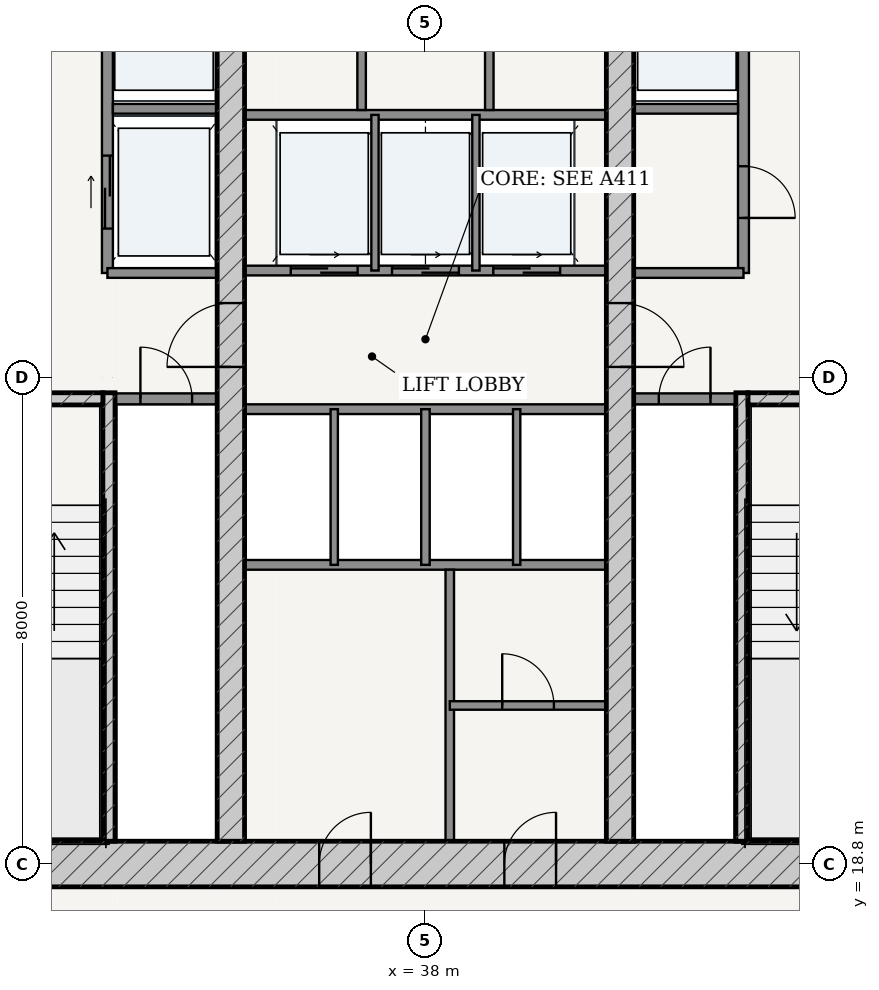
"""IFC4 building model, lengths in metres.
Left out: names, types, materials, properties, quantities, classifications, styles, units other than length and angle.
Written with IfcOpenShell. Run it as: python <this file> out.ifc"""

import sys

from ifc_helpers import new_model, si_unit, direction, frame, frame_2d, origin, place, context, subcontext, project, spatial, rectangle, extrude, source, transform, mapped, element, fill, save


model = new_model("IFC4")
c1 = context("Model", 3, precision=1e-05, world=origin(), true_north=direction((-0.2419218956, 0.970295726276)))
c2 = subcontext(c1, "Body", "Model", "MODEL_VIEW")
j1 = project(units=[si_unit("LENGTHUNIT", "METRE"), si_unit("PLANEANGLEUNIT", "RADIAN")], contexts=[c1])
p1 = place(None, origin())
s1 = spatial("IfcSite", under=j1, at=p1, CompositionType="ELEMENT")
p2 = place(p1, origin())
s2 = spatial("IfcBuilding", under=s1, at=p2, CompositionType="ELEMENT")
p3 = place(p2, frame((0.0, 0.0, 45.6)))
s3 = spatial("IfcBuildingStorey", under=s2, at=p3, CompositionType="ELEMENT", Elevation=45.6)
p4 = place(p3, frame((28.625, 18.8, 0.0), z_axis=(0.0, 0.0, 1.0), x_axis=(1.0, 0.0, 0.0)))
e1 = element("IfcWall", 1, at=p4, inside=s3, PredefinedType="SHEAR", context=c2, shape_type="SweptSolid", body=[
    extrude(rectangle(XDim=18.75, YDim=0.75, at=frame_2d((9.375, 0.0))), origin(), (0.0, 0.0, 1.0), 3.32),
])
p5 = place(p4, frame((7.627, 0.0, 0.0)))
e2 = element("IfcOpeningElement", 2, at=p5, cuts=e1, PredefinedType="OPENING", context=c2, shape_type="SweptSolid", body=[
    extrude(rectangle(XDim=0.85, YDim=2.1, at=frame_2d((0.425, 1.05))), frame((0.0, 0.385, 0.0), z_axis=(0.0, -1.0, 0.0), x_axis=(1.0, 0.0, 0.0)), (0.0, 0.0, 1.0), 0.77),
])
p6 = place(p4, frame((10.673, 0.0, 0.0)))
e3 = element("IfcOpeningElement", 3, at=p6, cuts=e1, PredefinedType="OPENING", context=c2, shape_type="SweptSolid", body=[
    extrude(rectangle(XDim=0.85, YDim=2.1, at=frame_2d((0.425, 1.05))), frame((0.0, 0.385, 0.0), z_axis=(0.0, -1.0, 0.0), x_axis=(1.0, 0.0, 0.0)), (0.0, 0.0, 1.0), 0.77),
])
p7 = place(p3, frame((32.795, 19.175, 0.0), z_axis=(0.0, 0.0, 1.0), x_axis=(0.0, 1.0, 0.0)))
e4 = element("IfcWall", 4, at=p7, inside=s3, PredefinedType="SOLIDWALL", context=c2, shape_type="SweptSolid", body=[
    extrude(rectangle(XDim=7.375, YDim=0.2, at=frame_2d((3.688, 0.0))), origin(), (0.0, 0.0, 1.0), 3.32),
])
p8 = place(p3, frame((29.375, 26.45, 0.0), z_axis=(0.0, 0.0, 1.0), x_axis=(1.0, 0.0, 0.0)))
e5 = element("IfcWall", 5, at=p8, inside=s3, PredefinedType="SOLIDWALL", context=c2, shape_type="SweptSolid", body=[
    extrude(rectangle(XDim=3.32, YDim=0.2, at=frame_2d((1.66, 0.0))), origin(), (0.0, 0.0, 1.0), 3.32),
])
p9 = place(p8, frame((1.185, 0.0, 0.0)))
e6 = element("IfcOpeningElement", 6, at=p9, cuts=e5, PredefinedType="OPENING", context=c2, shape_type="SweptSolid", body=[
    extrude(rectangle(XDim=0.95, YDim=2.15, at=frame_2d((0.475, 1.075))), frame((0.0, 0.11, 0.0), z_axis=(0.0, -1.0, 0.0), x_axis=(1.0, 0.0, 0.0)), (0.0, 0.0, 1.0), 0.22),
])
p10 = place(p3, frame((43.205, 19.175, 0.0), z_axis=(0.0, 0.0, 1.0), x_axis=(0.0, 1.0, 0.0)))
e7 = element("IfcWall", 7, at=p10, inside=s3, PredefinedType="SOLIDWALL", context=c2, shape_type="SweptSolid", body=[
    extrude(rectangle(XDim=7.375, YDim=0.2, at=frame_2d((3.688, 0.0))), origin(), (0.0, 0.0, 1.0), 3.32),
])
p11 = place(p3, frame((43.305, 26.45, 0.0), z_axis=(0.0, 0.0, 1.0), x_axis=(1.0, 0.0, 0.0)))
e8 = element("IfcWall", 8, at=p11, inside=s3, PredefinedType="SOLIDWALL", context=c2, shape_type="SweptSolid", body=[
    extrude(rectangle(XDim=3.32, YDim=0.2, at=frame_2d((1.66, 0.0))), origin(), (0.0, 0.0, 1.0), 3.32),
])
p12 = place(p11, frame((1.185, 0.0, 0.0)))
e9 = element("IfcOpeningElement", 9, at=p12, cuts=e8, PredefinedType="OPENING", context=c2, shape_type="SweptSolid", body=[
    extrude(rectangle(XDim=0.95, YDim=2.15, at=frame_2d((0.475, 1.075))), frame((0.0, 0.11, 0.0), z_axis=(0.0, -1.0, 0.0), x_axis=(1.0, 0.0, 0.0)), (0.0, 0.0, 1.0), 0.22),
])
p13 = place(p3, frame((34.8, 19.175, 0.0), z_axis=(0.0, 0.0, 1.0), x_axis=(0.0, 1.0, 0.0)))
e10 = element("IfcWall", 10, at=p13, inside=s3, PredefinedType="SHEAR", context=c2, shape_type="SweptSolid", body=[
    extrude(rectangle(XDim=15.25, YDim=0.45, at=frame_2d((7.625, 0.0))), origin(), (0.0, 0.0, 1.0), 3.32),
])
p14 = place(p13, frame((7.8, 0.0, 0.0)))
e11 = element("IfcOpeningElement", 11, at=p14, cuts=e10, PredefinedType="OPENING", context=c2, shape_type="SweptSolid", body=[
    extrude(rectangle(XDim=1.05, YDim=2.15, at=frame_2d((0.525, 1.075))), frame((0.0, 0.235, 0.0), z_axis=(0.0, -1.0, 0.0), x_axis=(1.0, 0.0, 0.0)), (0.0, 0.0, 1.0), 0.47),
])
p15 = place(p3, frame((41.2, 19.175, 0.0), z_axis=(0.0, 0.0, 1.0), x_axis=(0.0, 1.0, 0.0)))
e12 = element("IfcWall", 12, at=p15, inside=s3, PredefinedType="SHEAR", context=c2, shape_type="SweptSolid", body=[
    extrude(rectangle(XDim=15.25, YDim=0.45, at=frame_2d((7.625, 0.0))), origin(), (0.0, 0.0, 1.0), 3.32),
])
p16 = place(p15, frame((7.8, 0.0, 0.0)))
e13 = element("IfcOpeningElement", 13, at=p16, cuts=e12, PredefinedType="OPENING", context=c2, shape_type="SweptSolid", body=[
    extrude(rectangle(XDim=1.05, YDim=2.15, at=frame_2d((0.525, 1.075))), frame((0.0, 0.235, 0.0), z_axis=(0.0, -1.0, 0.0), x_axis=(1.0, 0.0, 0.0)), (0.0, 0.0, 1.0), 0.47),
])
p17 = place(p3, frame((32.9, 26.45, 0.0), z_axis=(0.0, 0.0, 1.0), x_axis=(1.0, 0.0, 0.0)))
e14 = element("IfcWall", 14, at=p17, inside=s3, PredefinedType="PARTITIONING", context=c2, shape_type="SweptSolid", body=[
    extrude(rectangle(XDim=1.675, YDim=0.18, at=frame_2d((0.837, 0.0))), origin(), (0.0, 0.0, 1.0), 3.32),
])
p18 = place(p17, frame((0.413, 0.0, 0.0)))
e15 = element("IfcOpeningElement", 15, at=p18, cuts=e14, PredefinedType="OPENING", context=c2, shape_type="SweptSolid", body=[
    extrude(rectangle(XDim=0.85, YDim=2.1, at=frame_2d((0.425, 1.05))), frame((0.0, 0.1, 0.0), z_axis=(0.0, -1.0, 0.0), x_axis=(1.0, 0.0, 0.0)), (0.0, 0.0, 1.0), 0.2),
])
p19 = place(p3, frame((41.425, 26.45, 0.0), z_axis=(0.0, 0.0, 1.0), x_axis=(1.0, 0.0, 0.0)))
e16 = element("IfcWall", 16, at=p19, inside=s3, PredefinedType="PARTITIONING", context=c2, shape_type="SweptSolid", body=[
    extrude(rectangle(XDim=1.675, YDim=0.18, at=frame_2d((0.837, 0.0))), origin(), (0.0, 0.0, 1.0), 3.32),
])
p20 = place(p19, frame((0.413, 0.0, 0.0)))
e17 = element("IfcOpeningElement", 17, at=p20, cuts=e16, PredefinedType="OPENING", context=c2, shape_type="SweptSolid", body=[
    extrude(rectangle(XDim=0.85, YDim=2.1, at=frame_2d((0.425, 1.05))), frame((0.0, 0.1, 0.0), z_axis=(0.0, -1.0, 0.0), x_axis=(1.0, 0.0, 0.0)), (0.0, 0.0, 1.0), 0.2),
])
p21 = place(p3, frame((32.77, 28.52, 0.0), z_axis=(0.0, 0.0, 1.0), x_axis=(0.0, 1.0, 0.0)))
e18 = element("IfcWall", 18, at=p21, inside=s3, PredefinedType="PARTITIONING", context=c2, shape_type="SweptSolid", body=[
    extrude(rectangle(XDim=5.905, YDim=0.18, at=frame_2d((2.953, 0.0))), origin(), (0.0, 0.0, 1.0), 3.32),
])
p22 = place(p21, frame((3.655, 0.0, 0.0)))
e19 = element("IfcOpeningElement", 19, at=p22, cuts=e18, PredefinedType="OPENING", context=c2, shape_type="SweptSolid", body=[
    extrude(rectangle(XDim=1.15, YDim=2.2, at=frame_2d((0.575, 1.1))), frame((0.0, 0.1, 0.0), z_axis=(0.0, -1.0, 0.0), x_axis=(1.0, 0.0, 0.0)), (0.0, 0.0, 1.0), 0.2),
])
p23 = place(p21, frame((0.73, 0.0, 0.0)))
e20 = element("IfcOpeningElement", 20, at=p23, cuts=e18, PredefinedType="OPENING", context=c2, shape_type="SweptSolid", body=[
    extrude(rectangle(XDim=1.2, YDim=2.25, at=frame_2d((0.6, 1.125))), frame((0.0, 0.1, 0.0), z_axis=(0.0, -1.0, 0.0), x_axis=(1.0, 0.0, 0.0)), (0.0, 0.0, 1.0), 0.2),
])
p24 = place(p3, frame((32.86, 31.22, 0.0), z_axis=(0.0, 0.0, 1.0), x_axis=(1.0, 0.0, 0.0)))
e21 = element("IfcWall", 21, at=p24, inside=s3, PredefinedType="PARTITIONING", context=c2, shape_type="SweptSolid", body=[
    extrude(rectangle(XDim=1.715, YDim=0.16, at=frame_2d((0.857, 0.0))), origin(), (0.0, 0.0, 1.0), 3.32),
])
p25 = place(p3, frame((32.77, 28.52, 0.0), z_axis=(0.0, 0.0, 1.0), x_axis=(1.0, 0.0, 0.0)))
e22 = element("IfcWall", 22, at=p25, inside=s3, PredefinedType="PARTITIONING", context=c2, shape_type="SweptSolid", body=[
    extrude(rectangle(XDim=1.805, YDim=0.16, at=frame_2d((0.902, 0.0))), origin(), (0.0, 0.0, 1.0), 3.32),
])
p26 = place(p3, frame((43.23, 28.52, 0.0), z_axis=(0.0, 0.0, 1.0), x_axis=(0.0, 1.0, 0.0)))
e23 = element("IfcWall", 23, at=p26, inside=s3, PredefinedType="PARTITIONING", context=c2, shape_type="SweptSolid", body=[
    extrude(rectangle(XDim=5.905, YDim=0.18, at=frame_2d((2.953, 0.0))), origin(), (0.0, 0.0, 1.0), 3.32),
])
p27 = place(p26, frame((0.905, 0.0, 0.0)))
e24 = element("IfcOpeningElement", 24, at=p27, cuts=e23, PredefinedType="OPENING", context=c2, shape_type="SweptSolid", body=[
    extrude(rectangle(XDim=0.85, YDim=2.1, at=frame_2d((0.425, 1.05))), frame((0.0, 0.1, 0.0), z_axis=(0.0, -1.0, 0.0), x_axis=(1.0, 0.0, 0.0)), (0.0, 0.0, 1.0), 0.2),
])
p28 = place(p26, frame((3.655, 0.0, 0.0)))
e25 = element("IfcOpeningElement", 25, at=p28, cuts=e23, PredefinedType="OPENING", context=c2, shape_type="SweptSolid", body=[
    extrude(rectangle(XDim=1.15, YDim=2.2, at=frame_2d((0.575, 1.1))), frame((0.0, 0.1, 0.0), z_axis=(0.0, -1.0, 0.0), x_axis=(1.0, 0.0, 0.0)), (0.0, 0.0, 1.0), 0.2),
])
p29 = place(p3, frame((41.425, 31.22, 0.0), z_axis=(0.0, 0.0, 1.0), x_axis=(1.0, 0.0, 0.0)))
e26 = element("IfcWall", 26, at=p29, inside=s3, PredefinedType="PARTITIONING", context=c2, shape_type="SweptSolid", body=[
    extrude(rectangle(XDim=1.715, YDim=0.16, at=frame_2d((0.857, 0.0))), origin(), (0.0, 0.0, 1.0), 3.32),
])
p30 = place(p3, frame((41.425, 28.52, 0.0), z_axis=(0.0, 0.0, 1.0), x_axis=(1.0, 0.0, 0.0)))
e27 = element("IfcWall", 27, at=p30, inside=s3, PredefinedType="PARTITIONING", context=c2, shape_type="SweptSolid", body=[
    extrude(rectangle(XDim=1.805, YDim=0.16, at=frame_2d((0.902, 0.0))), origin(), (0.0, 0.0, 1.0), 3.32),
])
p31 = place(p3, frame((35.025, 28.56, 0.0), z_axis=(0.0, 0.0, 1.0), x_axis=(1.0, 0.0, 0.0)))
e28 = element("IfcWall", 28, at=p31, inside=s3, PredefinedType="PARTITIONING", context=c2, shape_type="SweptSolid", body=[
    extrude(rectangle(XDim=5.95, YDim=0.16, at=frame_2d((2.975, 0.0))), origin(), (0.0, 0.0, 1.0), 3.32),
])
p32 = place(p31, frame((0.76, 0.0, 0.0)))
e29 = element("IfcOpeningElement", 29, at=p32, cuts=e28, PredefinedType="OPENING", context=c2, shape_type="SweptSolid", body=[
    extrude(rectangle(XDim=1.1, YDim=2.2, at=frame_2d((0.55, 1.1))), frame((0.0, 0.09, 0.0), z_axis=(0.0, -1.0, 0.0), x_axis=(1.0, 0.0, 0.0)), (0.0, 0.0, 1.0), 0.18),
])
p33 = place(p31, frame((2.425, 0.0, 0.0)))
e30 = element("IfcOpeningElement", 30, at=p33, cuts=e28, PredefinedType="OPENING", context=c2, shape_type="SweptSolid", body=[
    extrude(rectangle(XDim=1.1, YDim=2.2, at=frame_2d((0.55, 1.1))), frame((0.0, 0.09, 0.0), z_axis=(0.0, -1.0, 0.0), x_axis=(1.0, 0.0, 0.0)), (0.0, 0.0, 1.0), 0.18),
])
p34 = place(p31, frame((4.09, 0.0, 0.0)))
e31 = element("IfcOpeningElement", 31, at=p34, cuts=e28, PredefinedType="OPENING", context=c2, shape_type="SweptSolid", body=[
    extrude(rectangle(XDim=1.1, YDim=2.2, at=frame_2d((0.55, 1.1))), frame((0.0, 0.09, 0.0), z_axis=(0.0, -1.0, 0.0), x_axis=(1.0, 0.0, 0.0)), (0.0, 0.0, 1.0), 0.18),
])
p35 = place(p3, frame((35.025, 31.12, 0.0), z_axis=(0.0, 0.0, 1.0), x_axis=(1.0, 0.0, 0.0)))
e32 = element("IfcWall", 32, at=p35, inside=s3, PredefinedType="PARTITIONING", context=c2, shape_type="SweptSolid", body=[
    extrude(rectangle(XDim=5.95, YDim=0.16, at=frame_2d((2.975, 0.0))), origin(), (0.0, 0.0, 1.0), 3.32),
])
for number, where, z_axis, x_axis in (
    (33, (37.17, 28.56, 0.0), (0.0, 0.0, 1.0), (0.0, 1.0, 0.0)),
    (34, (38.83, 28.56, 0.0), (0.0, 0.0, 1.0), (0.0, 1.0, 0.0)),
):
    element("IfcWall", number, at=place(p3, frame(where, z_axis=z_axis, x_axis=x_axis)), inside=s3, PredefinedType="PARTITIONING", context=c2, shape_type="SweptSolid", body=[
        extrude(rectangle(XDim=2.56, YDim=0.12, at=frame_2d((1.28, 0.0))), origin(), (0.0, 0.0, 1.0), 3.32),
    ])
for number, where, z_axis, x_axis in (
    (35, (36.95, 31.2, 0.0), (0.0, 0.0, 1.0), (0.0, 1.0, 0.0)),
    (36, (39.05, 31.2, 0.0), (0.0, 0.0, 1.0), (0.0, 1.0, 0.0)),
):
    element("IfcWall", number, at=place(p3, frame(where, z_axis=z_axis, x_axis=x_axis)), inside=s3, PredefinedType="PARTITIONING", context=c2, shape_type="SweptSolid", body=[
        extrude(rectangle(XDim=3.225, YDim=0.14, at=frame_2d((1.613, 0.0))), origin(), (0.0, 0.0, 1.0), 3.32),
    ])
for number, where, z_axis, x_axis in (
    (37, (35.025, 26.28, 0.0), (0.0, 0.0, 1.0), (1.0, 0.0, 0.0)),
    (38, (35.025, 23.72, 0.0), (0.0, 0.0, 1.0), (1.0, 0.0, 0.0)),
):
    element("IfcWall", number, at=place(p3, frame(where, z_axis=z_axis, x_axis=x_axis)), inside=s3, PredefinedType="PARTITIONING", context=c2, shape_type="SweptSolid", body=[
        extrude(rectangle(XDim=5.95, YDim=0.16, at=frame_2d((2.975, 0.0))), origin(), (0.0, 0.0, 1.0), 3.32),
    ])
p36 = place(p3, frame((36.5, 23.72, 0.0), z_axis=(0.0, 0.0, 1.0), x_axis=(0.0, 1.0, 0.0)))
e39 = element("IfcWall", 39, at=p36, inside=s3, PredefinedType="PARTITIONING", context=c2, shape_type="SweptSolid", body=[
    extrude(rectangle(XDim=2.56, YDim=0.12, at=frame_2d((1.28, 0.0))), origin(), (0.0, 0.0, 1.0), 3.32),
])
p37 = place(p3, frame((38.0, 23.72, 0.0), z_axis=(0.0, 0.0, 1.0), x_axis=(0.0, 1.0, 0.0)))
e40 = element("IfcWall", 40, at=p37, inside=s3, PredefinedType="PARTITIONING", context=c2, shape_type="SweptSolid", body=[
    extrude(rectangle(XDim=2.56, YDim=0.14, at=frame_2d((1.28, 0.0))), origin(), (0.0, 0.0, 1.0), 3.32),
])
p38 = place(p3, frame((39.5, 23.72, 0.0), z_axis=(0.0, 0.0, 1.0), x_axis=(0.0, 1.0, 0.0)))
e41 = element("IfcWall", 41, at=p38, inside=s3, PredefinedType="PARTITIONING", context=c2, shape_type="SweptSolid", body=[
    extrude(rectangle(XDim=2.56, YDim=0.12, at=frame_2d((1.28, 0.0))), origin(), (0.0, 0.0, 1.0), 3.32),
])
p39 = place(p3, frame((38.4, 19.175, 0.0), z_axis=(0.0, 0.0, 1.0), x_axis=(0.0, 1.0, 0.0)))
e42 = element("IfcWall", 42, at=p39, inside=s3, PredefinedType="PARTITIONING", context=c2, shape_type="SweptSolid", body=[
    extrude(rectangle(XDim=4.465, YDim=0.14, at=frame_2d((2.232, 0.0))), origin(), (0.0, 0.0, 1.0), 3.32),
])
p40 = place(p3, frame((38.4, 21.407, 0.0), z_axis=(0.0, 0.0, 1.0), x_axis=(1.0, 0.0, 0.0)))
e43 = element("IfcWall", 43, at=p40, inside=s3, PredefinedType="PARTITIONING", context=c2, shape_type="SweptSolid", body=[
    extrude(rectangle(XDim=2.575, YDim=0.14, at=frame_2d((1.288, 0.0))), origin(), (0.0, 0.0, 1.0), 3.32),
])
p41 = place(p40, frame((0.863, 0.0, 0.0)))
e44 = element("IfcOpeningElement", 44, at=p41, cuts=e43, PredefinedType="OPENING", context=c2, shape_type="SweptSolid", body=[
    extrude(rectangle(XDim=0.85, YDim=2.1, at=frame_2d((0.425, 1.05))), frame((0.0, 0.08, 0.0), z_axis=(0.0, -1.0, 0.0), x_axis=(1.0, 0.0, 0.0)), (0.0, 0.0, 1.0), 0.16),
])
m1 = source(origin(), c2, "Body", "SweptSolid", [
    extrude(rectangle(XDim=1.05, YDim=2.15, at=frame_2d((0.525, 1.075))), frame((0.0, 0.025, 0.0), z_axis=(0.0, -1.0, 0.0), x_axis=(1.0, 0.0, 0.0)), (0.0, 0.0, 1.0), 0.05),
])
p42 = place(p14, origin())
e45 = element("IfcDoor", 45, at=p42, inside=s3, OperationType="SINGLE_SWING_LEFT", PredefinedType="DOOR", context=c2, shape_type="MappedRepresentation", body=[
    mapped(m1, transform((0.0, 0.0, 0.0), scale=1.0)),
])
fill(e11, e45)
p43 = place(p16, frame((1.05, 0.0, 0.0), z_axis=(0.0, 0.0, 1.0), x_axis=(-1.0, 0.0, 0.0)))
e46 = element("IfcDoor", 46, at=p43, inside=s3, OperationType="SINGLE_SWING_RIGHT", PredefinedType="DOOR", context=c2, shape_type="MappedRepresentation", body=[
    mapped(m1, transform((0.0, 0.0, 0.0), scale=1.0)),
])
fill(e13, e46)
m2 = source(origin(), c2, "Body", "SweptSolid", [
    extrude(rectangle(XDim=0.85, YDim=2.1, at=frame_2d((0.425, 1.05))), frame((0.0, 0.025, 0.0), z_axis=(0.0, -1.0, 0.0), x_axis=(1.0, 0.0, 0.0)), (0.0, 0.0, 1.0), 0.05),
])
p44 = place(p18, origin())
e47 = element("IfcDoor", 47, at=p44, inside=s3, OperationType="SINGLE_SWING_LEFT", PredefinedType="DOOR", context=c2, shape_type="MappedRepresentation", body=[
    mapped(m2, transform((0.0, 0.0, 0.0), scale=1.0)),
])
fill(e15, e47)
p45 = place(p20, origin())
e48 = element("IfcDoor", 48, at=p45, inside=s3, OperationType="SINGLE_SWING_RIGHT", PredefinedType="DOOR", context=c2, shape_type="MappedRepresentation", body=[
    mapped(m2, transform((0.0, 0.0, 0.0), scale=1.0)),
])
fill(e17, e48)
p46 = place(p27, frame((0.85, 0.0, 0.0), z_axis=(0.0, 0.0, 1.0), x_axis=(-1.0, 0.0, 0.0)))
e49 = element("IfcDoor", 49, at=p46, inside=s3, OperationType="SINGLE_SWING_RIGHT", PredefinedType="DOOR", context=c2, shape_type="MappedRepresentation", body=[
    mapped(m2, transform((0.0, 0.0, 0.0), scale=1.0)),
])
fill(e24, e49)
p47 = place(p5, origin())
e50 = element("IfcDoor", 50, at=p47, inside=s3, OperationType="SINGLE_SWING_RIGHT", PredefinedType="DOOR", context=c2, shape_type="MappedRepresentation", body=[
    mapped(m2, transform((0.0, 0.0, 0.0), scale=1.0)),
])
fill(e2, e50)
p48 = place(p6, origin())
e51 = element("IfcDoor", 51, at=p48, inside=s3, OperationType="SINGLE_SWING_RIGHT", PredefinedType="DOOR", context=c2, shape_type="MappedRepresentation", body=[
    mapped(m2, transform((0.0, 0.0, 0.0), scale=1.0)),
])
fill(e3, e51)
p49 = place(p41, origin())
e52 = element("IfcDoor", 52, at=p49, inside=s3, OperationType="SINGLE_SWING_LEFT", PredefinedType="DOOR", context=c2, shape_type="MappedRepresentation", body=[
    mapped(m2, transform((0.0, 0.0, 0.0), scale=1.0)),
])
fill(e44, e52)
m3 = source(origin(), c2, "Body", "SweptSolid", [
    extrude(rectangle(XDim=1.2, YDim=2.25, at=frame_2d((0.6, 1.125))), frame((0.0, 0.025, 0.0), z_axis=(0.0, -1.0, 0.0), x_axis=(1.0, 0.0, 0.0)), (0.0, 0.0, 1.0), 0.05),
])
p50 = place(p23, origin())
e53 = element("IfcDoor", 53, at=p50, inside=s3, OperationType="DOUBLE_DOOR_SLIDING", PredefinedType="DOOR", context=c2, shape_type="MappedRepresentation", body=[
    mapped(m3, transform((0.0, 0.0, 0.0), scale=1.0)),
])
fill(e20, e53)
m4 = source(origin(), c2, "Body", "SweptSolid", [
    extrude(rectangle(XDim=1.1, YDim=2.2, at=frame_2d((0.55, 1.1))), frame((0.0, 0.025, 0.0), z_axis=(0.0, -1.0, 0.0), x_axis=(1.0, 0.0, 0.0)), (0.0, 0.0, 1.0), 0.05),
])
p51 = place(p32, origin())
e54 = element("IfcDoor", 54, at=p51, inside=s3, OperationType="DOUBLE_DOOR_SLIDING", PredefinedType="DOOR", context=c2, shape_type="MappedRepresentation", body=[
    mapped(m4, transform((0.0, 0.0, 0.0), scale=1.0)),
])
fill(e29, e54)
p52 = place(p33, origin())
e55 = element("IfcDoor", 55, at=p52, inside=s3, OperationType="DOUBLE_DOOR_SLIDING", PredefinedType="DOOR", context=c2, shape_type="MappedRepresentation", body=[
    mapped(m4, transform((0.0, 0.0, 0.0), scale=1.0)),
])
fill(e30, e55)
p53 = place(p34, origin())
e56 = element("IfcDoor", 56, at=p53, inside=s3, OperationType="DOUBLE_DOOR_SLIDING", PredefinedType="DOOR", context=c2, shape_type="MappedRepresentation", body=[
    mapped(m4, transform((0.0, 0.0, 0.0), scale=1.0)),
])
fill(e31, e56)
save(model, sys.argv[1])
